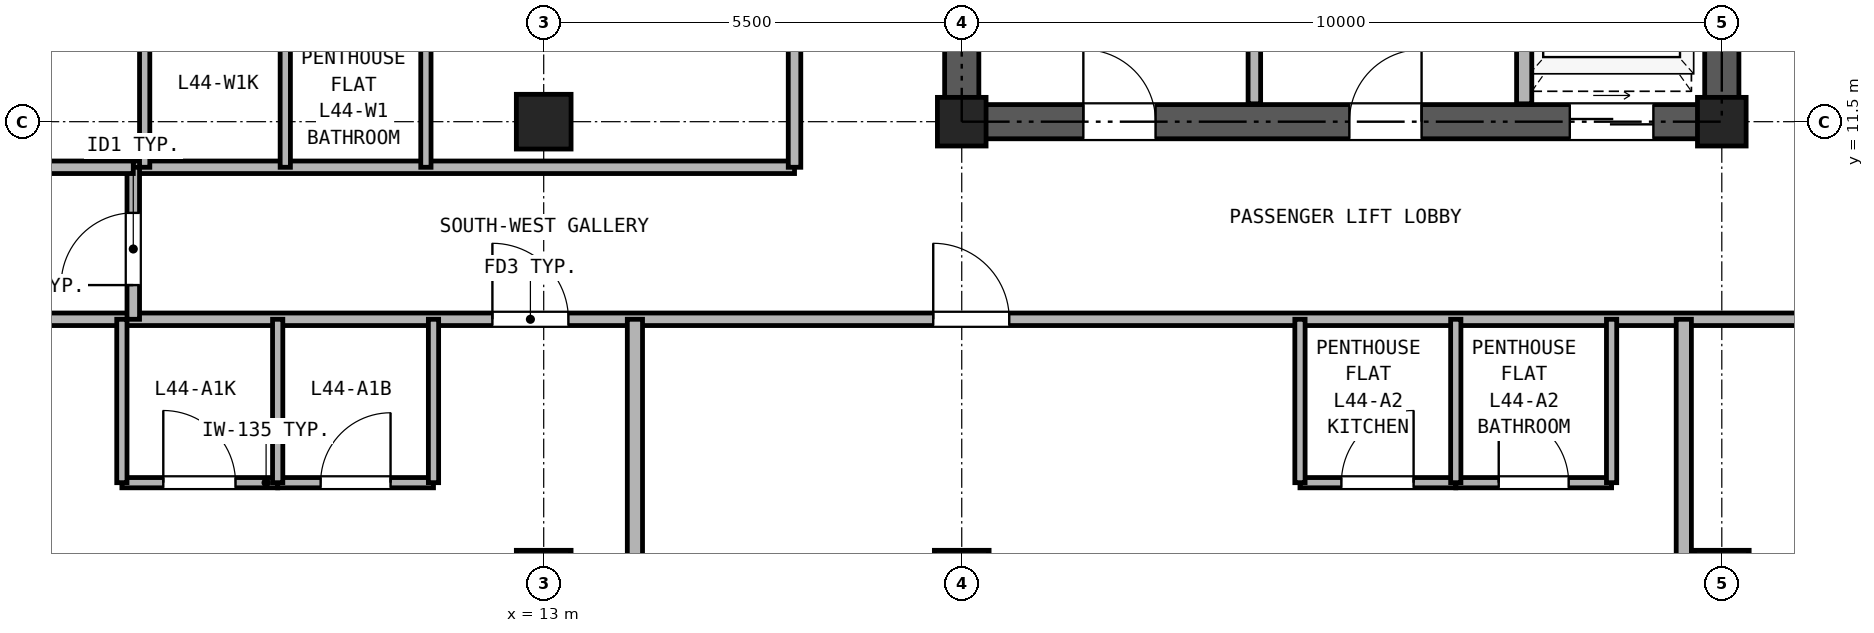
"""IFC4 building model, lengths in metres.
Left out: names, types, materials, properties, quantities, classifications, styles, units other than length and angle.
Written with IfcOpenShell. Run it as: python <this file> out.ifc"""

import sys

from ifc_helpers import new_model, si_unit, direction, frame, frame_2d, origin, origin_2d, place, context, subcontext, project, spatial, rectangle, hollow_rectangle, extrude, source, transform, mapped, element, fill, save


model = new_model("IFC4")
c1 = context("Model", 3, precision=1e-05, world=origin(), true_north=direction((0.0, 1.0)))
c2 = subcontext(c1, "Body", "Model", "MODEL_VIEW")
j1 = project(units=[si_unit("LENGTHUNIT", "METRE"), si_unit("PLANEANGLEUNIT", "RADIAN")], contexts=[c1])
p1 = place(None, origin())
s1 = spatial("IfcSite", under=j1, at=p1, CompositionType="ELEMENT")
p2 = place(p1, origin())
s2 = spatial("IfcBuilding", under=s1, at=p2, CompositionType="ELEMENT")
p3 = place(p2, frame((0.0, 0.0, 159.3)))
s3 = spatial("IfcBuildingStorey", under=s2, at=p3, CompositionType="ELEMENT", Elevation=159.3)
m1 = source(origin(), c2, "Body", "SweptSolid", [
    extrude(hollow_rectangle(XDim=0.72, YDim=0.72, WallThickness=0.04, at=origin_2d()), origin(), (0.0, 0.0, 1.0), 2.95),
])
for number, where, z_axis, x_axis in (
    (1, (13.0, 5.5, 0.0), (0.0, 0.0, 1.0), (1.0, 0.0, 0.0)),
    (2, (13.0, 11.5, 0.0), (0.0, 0.0, 1.0), (1.0, 0.0, 0.0)),
    (3, (18.5, 5.5, 0.0), (0.0, 0.0, 1.0), (1.0, 0.0, 0.0)),
):
    element("IfcColumn", number, at=place(p3, frame(where, z_axis=z_axis, x_axis=x_axis)), inside=s3, PredefinedType="COLUMN", context=c2, shape_type="MappedRepresentation", body=[
        mapped(m1, transform((0.0, 0.0, 0.0), x_axis=(1.0, 0.0, 0.0), y_axis=(0.0, 1.0, 0.0), z_axis=(0.0, 0.0, 1.0), scale=1.0)),
    ])
m2 = source(origin(), c2, "Body", "SweptSolid", [
    extrude(hollow_rectangle(XDim=0.64, YDim=0.64, WallThickness=0.035, at=origin_2d()), origin(), (0.0, 0.0, 1.0), 2.95),
])
p4 = place(p3, frame((18.5, 11.5, 0.0), z_axis=(0.0, 0.0, 1.0), x_axis=(1.0, 0.0, 0.0)))
e4 = element("IfcColumn", 4, at=p4, inside=s3, PredefinedType="COLUMN", context=c2, shape_type="MappedRepresentation", body=[
    mapped(m2, transform((0.0, 0.0, 0.0), x_axis=(1.0, 0.0, 0.0), y_axis=(0.0, 1.0, 0.0), z_axis=(0.0, 0.0, 1.0), scale=1.0)),
])
p5 = place(p3, frame((28.5, 5.5, 0.0), z_axis=(0.0, 0.0, 1.0), x_axis=(1.0, 0.0, 0.0)))
e5 = element("IfcColumn", 5, at=p5, inside=s3, PredefinedType="COLUMN", context=c2, shape_type="MappedRepresentation", body=[
    mapped(m1, transform((0.0, 0.0, 0.0), x_axis=(1.0, 0.0, 0.0), y_axis=(0.0, 1.0, 0.0), z_axis=(0.0, 0.0, 1.0), scale=1.0)),
])
p6 = place(p3, frame((28.5, 11.5, 0.0), z_axis=(0.0, 0.0, 1.0), x_axis=(1.0, 0.0, 0.0)))
e6 = element("IfcColumn", 6, at=p6, inside=s3, PredefinedType="COLUMN", context=c2, shape_type="MappedRepresentation", body=[
    mapped(m2, transform((0.0, 0.0, 0.0), x_axis=(1.0, 0.0, 0.0), y_axis=(0.0, 1.0, 0.0), z_axis=(0.0, 0.0, 1.0), scale=1.0)),
])
p7 = place(p3, frame((18.275, 11.5, 0.0), z_axis=(0.0, 0.0, 1.0), x_axis=(1.0, 0.0, 0.0)))
e7 = element("IfcWall", 7, at=p7, inside=s3, PredefinedType="SHEAR", context=c2, shape_type="SweptSolid", body=[
    extrude(rectangle(XDim=10.45, YDim=0.45, at=frame_2d((5.225, 0.0))), origin(), (0.0, 0.0, 1.0), 2.95),
])
p8 = place(p7, frame((1.825, 0.0, 0.0)))
e8 = element("IfcOpeningElement", 8, at=p8, cuts=e7, PredefinedType="OPENING", context=c2, shape_type="SweptSolid", body=[
    extrude(rectangle(XDim=0.95, YDim=2.15, at=frame_2d((0.475, 1.075))), frame((0.0, 0.235, 0.0), z_axis=(0.0, -1.0, 0.0), x_axis=(1.0, 0.0, 0.0)), (0.0, 0.0, 1.0), 0.47),
])
p9 = place(p7, frame((5.325, 0.0, 0.0)))
e9 = element("IfcOpeningElement", 9, at=p9, cuts=e7, PredefinedType="OPENING", context=c2, shape_type="SweptSolid", body=[
    extrude(rectangle(XDim=0.95, YDim=2.15, at=frame_2d((0.475, 1.075))), frame((0.0, 0.235, 0.0), z_axis=(0.0, -1.0, 0.0), x_axis=(1.0, 0.0, 0.0)), (0.0, 0.0, 1.0), 0.47),
])
p10 = place(p7, frame((8.225, 0.0, 0.0)))
e10 = element("IfcOpeningElement", 10, at=p10, cuts=e7, PredefinedType="OPENING", context=c2, shape_type="SweptSolid", body=[
    extrude(rectangle(XDim=1.1, YDim=2.25, at=frame_2d((0.55, 1.125))), frame((0.0, 0.235, 0.0), z_axis=(0.0, -1.0, 0.0), x_axis=(1.0, 0.0, 0.0)), (0.0, 0.0, 1.0), 0.47),
])
p11 = place(p3, frame((18.5, 11.725, 0.0), z_axis=(0.0, 0.0, 1.0), x_axis=(0.0, 1.0, 0.0)))
e11 = element("IfcWall", 11, at=p11, inside=s3, PredefinedType="SHEAR", context=c2, shape_type="SweptSolid", body=[
    extrude(rectangle(XDim=16.8, YDim=0.45, at=frame_2d((8.4, 0.0))), origin(), (0.0, 0.0, 1.0), 2.95),
])
p12 = place(p11, frame((7.425, 0.0, 0.0)))
e12 = element("IfcOpeningElement", 12, at=p12, cuts=e11, PredefinedType="OPENING", context=c2, shape_type="SweptSolid", body=[
    extrude(rectangle(XDim=1.15, YDim=2.2, at=frame_2d((0.575, 1.1))), frame((0.0, 0.235, 0.0), z_axis=(0.0, -1.0, 0.0), x_axis=(1.0, 0.0, 0.0)), (0.0, 0.0, 1.0), 0.47),
])
p13 = place(p3, frame((28.5, 11.725, 0.0), z_axis=(0.0, 0.0, 1.0), x_axis=(0.0, 1.0, 0.0)))
e13 = element("IfcWall", 13, at=p13, inside=s3, PredefinedType="SHEAR", context=c2, shape_type="SweptSolid", body=[
    extrude(rectangle(XDim=16.8, YDim=0.45, at=frame_2d((8.4, 0.0))), origin(), (0.0, 0.0, 1.0), 2.95),
])
p14 = place(p13, frame((7.425, 0.0, 0.0)))
e14 = element("IfcOpeningElement", 14, at=p14, cuts=e13, PredefinedType="OPENING", context=c2, shape_type="SweptSolid", body=[
    extrude(rectangle(XDim=1.15, YDim=2.2, at=frame_2d((0.575, 1.1))), frame((0.0, 0.235, 0.0), z_axis=(0.0, -1.0, 0.0), x_axis=(1.0, 0.0, 0.0)), (0.0, 0.0, 1.0), 0.47),
])
p15 = place(p3, frame((22.35, 11.735, 0.0), z_axis=(0.0, 0.0, 1.0), x_axis=(0.0, 1.0, 0.0)))
e15 = element("IfcWall", 15, at=p15, inside=s3, PredefinedType="PARTITIONING", context=c2, shape_type="SweptSolid", body=[
    extrude(rectangle(XDim=3.265, YDim=0.165, at=frame_2d((1.632, 0.0))), origin(), (0.0, 0.0, 1.0), 2.95),
])
p16 = place(p3, frame((25.9, 11.735, 0.0), z_axis=(0.0, 0.0, 1.0), x_axis=(0.0, 1.0, 0.0)))
e16 = element("IfcWall", 16, at=p16, inside=s3, PredefinedType="PARTITIONING", context=c2, shape_type="SweptSolid", body=[
    extrude(rectangle(XDim=3.265, YDim=0.2, at=frame_2d((1.632, 0.0))), origin(), (0.0, 0.0, 1.0), 2.95),
])
p17 = place(p3, frame((0.16, 8.9, 0.0), z_axis=(0.0, 0.0, 1.0), x_axis=(1.0, 0.0, 0.0)))
e17 = element("IfcWall", 17, at=p17, inside=s3, PredefinedType="PARTITIONING", context=c2, shape_type="SweptSolid", body=[
    extrude(rectangle(XDim=41.48, YDim=0.165, at=frame_2d((20.74, 0.0))), origin(), (0.0, 0.0, 1.0), 2.95),
])
p18 = place(p17, frame((12.165, 0.0, 0.0)))
e18 = element("IfcOpeningElement", 18, at=p18, cuts=e17, PredefinedType="OPENING", context=c2, shape_type="SweptSolid", body=[
    extrude(rectangle(XDim=1.0, YDim=2.15, at=frame_2d((0.5, 1.075))), frame((0.0, 0.093, 0.0), z_axis=(0.0, -1.0, 0.0), x_axis=(1.0, 0.0, 0.0)), (0.0, 0.0, 1.0), 0.185),
])
p19 = place(p17, frame((17.965, 0.0, 0.0)))
e19 = element("IfcOpeningElement", 19, at=p19, cuts=e17, PredefinedType="OPENING", context=c2, shape_type="SweptSolid", body=[
    extrude(rectangle(XDim=1.0, YDim=2.15, at=frame_2d((0.5, 1.075))), frame((0.0, 0.093, 0.0), z_axis=(0.0, -1.0, 0.0), x_axis=(1.0, 0.0, 0.0)), (0.0, 0.0, 1.0), 0.185),
])
p20 = place(p17, frame((31.115, 0.0, 0.0)))
e20 = element("IfcOpeningElement", 20, at=p20, cuts=e17, PredefinedType="OPENING", context=c2, shape_type="SweptSolid", body=[
    extrude(rectangle(XDim=1.0, YDim=2.15, at=frame_2d((0.5, 1.075))), frame((0.0, 0.093, 0.0), z_axis=(0.0, -1.0, 0.0), x_axis=(1.0, 0.0, 0.0)), (0.0, 0.0, 1.0), 0.185),
])
p21 = place(p3, frame((7.6, 10.9, 0.0), z_axis=(0.0, 0.0, 1.0), x_axis=(1.0, 0.0, 0.0)))
e21 = element("IfcWall", 21, at=p21, inside=s3, PredefinedType="PARTITIONING", context=c2, shape_type="SweptSolid", body=[
    extrude(rectangle(XDim=8.7, YDim=0.165, at=frame_2d((4.35, 0.0))), origin(), (0.0, 0.0, 1.0), 2.95),
])
p22 = place(p3, frame((7.6, 8.9, 0.0), z_axis=(0.0, 0.0, 1.0), x_axis=(0.0, 1.0, 0.0)))
e22 = element("IfcWall", 22, at=p22, inside=s3, PredefinedType="PARTITIONING", context=c2, shape_type="SweptSolid", body=[
    extrude(rectangle(XDim=2.0, YDim=0.165, at=frame_2d((1.0, 0.0))), origin(), (0.0, 0.0, 1.0), 2.95),
])
p23 = place(p22, frame((0.45, 0.0, 0.0)))
e23 = element("IfcOpeningElement", 23, at=p23, cuts=e22, PredefinedType="OPENING", context=c2, shape_type="SweptSolid", body=[
    extrude(rectangle(XDim=0.95, YDim=2.15, at=frame_2d((0.475, 1.075))), frame((0.0, 0.093, 0.0), z_axis=(0.0, -1.0, 0.0), x_axis=(1.0, 0.0, 0.0)), (0.0, 0.0, 1.0), 0.185),
])
p24 = place(p3, frame((16.3, 10.9, 0.0), z_axis=(0.0, 0.0, 1.0), x_axis=(0.0, 1.0, 0.0)))
e24 = element("IfcWall", 24, at=p24, inside=s3, PredefinedType="PARTITIONING", context=c2, shape_type="SweptSolid", body=[
    extrude(rectangle(XDim=24.24, YDim=0.165, at=frame_2d((12.12, 0.0))), origin(), (0.0, 0.0, 1.0), 2.95),
])
p25 = place(p24, frame((3.3, 0.0, 0.0)))
e25 = element("IfcOpeningElement", 25, at=p25, cuts=e24, PredefinedType="OPENING", context=c2, shape_type="SweptSolid", body=[
    extrude(rectangle(XDim=1.0, YDim=2.15, at=frame_2d((0.5, 1.075))), frame((0.0, 0.093, 0.0), z_axis=(0.0, -1.0, 0.0), x_axis=(1.0, 0.0, 0.0)), (0.0, 0.0, 1.0), 0.185),
])
p26 = place(p24, frame((11.25, 0.0, 0.0)))
e26 = element("IfcOpeningElement", 26, at=p26, cuts=e24, PredefinedType="OPENING", context=c2, shape_type="SweptSolid", body=[
    extrude(rectangle(XDim=1.0, YDim=2.15, at=frame_2d((0.5, 1.075))), frame((0.0, 0.093, 0.0), z_axis=(0.0, -1.0, 0.0), x_axis=(1.0, 0.0, 0.0)), (0.0, 0.0, 1.0), 0.185),
])
p27 = place(p24, frame((17.2, 0.0, 0.0)))
e27 = element("IfcOpeningElement", 27, at=p27, cuts=e24, PredefinedType="OPENING", context=c2, shape_type="SweptSolid", body=[
    extrude(rectangle(XDim=1.0, YDim=2.15, at=frame_2d((0.5, 1.075))), frame((0.0, 0.093, 0.0), z_axis=(0.0, -1.0, 0.0), x_axis=(1.0, 0.0, 0.0)), (0.0, 0.0, 1.0), 0.185),
])
p28 = place(p3, frame((7.45, 6.75, 0.0), z_axis=(0.0, 0.0, 1.0), x_axis=(1.0, 0.0, 0.0)))
e28 = element("IfcWall", 28, at=p28, inside=s3, PredefinedType="PARTITIONING", context=c2, shape_type="SweptSolid", body=[
    extrude(rectangle(XDim=2.05, YDim=0.135, at=frame_2d((1.025, 0.0))), origin(), (0.0, 0.0, 1.0), 2.95),
])
p29 = place(p28, frame((0.545, 0.0, 0.0)))
e29 = element("IfcOpeningElement", 29, at=p29, cuts=e28, PredefinedType="OPENING", context=c2, shape_type="SweptSolid", body=[
    extrude(rectangle(XDim=0.95, YDim=2.15, at=frame_2d((0.475, 1.075))), frame((0.0, 0.077, 0.0), z_axis=(0.0, -1.0, 0.0), x_axis=(1.0, 0.0, 0.0)), (0.0, 0.0, 1.0), 0.155),
])
p30 = place(p3, frame((9.5, 6.75, 0.0), z_axis=(0.0, 0.0, 1.0), x_axis=(1.0, 0.0, 0.0)))
e30 = element("IfcWall", 30, at=p30, inside=s3, PredefinedType="PARTITIONING", context=c2, shape_type="SweptSolid", body=[
    extrude(rectangle(XDim=2.05, YDim=0.135, at=frame_2d((1.025, 0.0))), origin(), (0.0, 0.0, 1.0), 2.95),
])
p31 = place(p30, frame((0.565, 0.0, 0.0)))
e31 = element("IfcOpeningElement", 31, at=p31, cuts=e30, PredefinedType="OPENING", context=c2, shape_type="SweptSolid", body=[
    extrude(rectangle(XDim=0.92, YDim=2.1, at=frame_2d((0.46, 1.05))), frame((0.0, 0.077, 0.0), z_axis=(0.0, -1.0, 0.0), x_axis=(1.0, 0.0, 0.0)), (0.0, 0.0, 1.0), 0.155),
])
for number, where, z_axis, x_axis in (
    (32, (7.45, 6.75, 0.0), (0.0, 0.0, 1.0), (0.0, 1.0, 0.0)),
    (33, (9.5, 6.75, 0.0), (0.0, 0.0, 1.0), (0.0, 1.0, 0.0)),
    (34, (11.55, 6.75, 0.0), (0.0, 0.0, 1.0), (0.0, 1.0, 0.0)),
):
    element("IfcWall", number, at=place(p3, frame(where, z_axis=z_axis, x_axis=x_axis)), inside=s3, PredefinedType="PARTITIONING", context=c2, shape_type="SweptSolid", body=[
        extrude(rectangle(XDim=2.15, YDim=0.135, at=frame_2d((1.075, 0.0))), origin(), (0.0, 0.0, 1.0), 2.95),
    ])
p32 = place(p3, frame((14.2, 0.16, 0.0), z_axis=(0.0, 0.0, 1.0), x_axis=(0.0, 1.0, 0.0)))
e35 = element("IfcWall", 35, at=p32, inside=s3, PredefinedType="PARTITIONING", context=c2, shape_type="SweptSolid", body=[
    extrude(rectangle(XDim=8.74, YDim=0.2, at=frame_2d((4.37, 0.0))), origin(), (0.0, 0.0, 1.0), 2.95),
])
p33 = place(p3, frame((22.95, 6.75, 0.0), z_axis=(0.0, 0.0, 1.0), x_axis=(1.0, 0.0, 0.0)))
e36 = element("IfcWall", 36, at=p33, inside=s3, PredefinedType="PARTITIONING", context=c2, shape_type="SweptSolid", body=[
    extrude(rectangle(XDim=2.05, YDim=0.135, at=frame_2d((1.025, 0.0))), origin(), (0.0, 0.0, 1.0), 2.95),
])
p34 = place(p33, frame((0.545, 0.0, 0.0)))
e37 = element("IfcOpeningElement", 37, at=p34, cuts=e36, PredefinedType="OPENING", context=c2, shape_type="SweptSolid", body=[
    extrude(rectangle(XDim=0.95, YDim=2.15, at=frame_2d((0.475, 1.075))), frame((0.0, 0.077, 0.0), z_axis=(0.0, -1.0, 0.0), x_axis=(1.0, 0.0, 0.0)), (0.0, 0.0, 1.0), 0.155),
])
p35 = place(p3, frame((25.0, 6.75, 0.0), z_axis=(0.0, 0.0, 1.0), x_axis=(1.0, 0.0, 0.0)))
e38 = element("IfcWall", 38, at=p35, inside=s3, PredefinedType="PARTITIONING", context=c2, shape_type="SweptSolid", body=[
    extrude(rectangle(XDim=2.05, YDim=0.135, at=frame_2d((1.025, 0.0))), origin(), (0.0, 0.0, 1.0), 2.95),
])
p36 = place(p35, frame((0.565, 0.0, 0.0)))
e39 = element("IfcOpeningElement", 39, at=p36, cuts=e38, PredefinedType="OPENING", context=c2, shape_type="SweptSolid", body=[
    extrude(rectangle(XDim=0.92, YDim=2.1, at=frame_2d((0.46, 1.05))), frame((0.0, 0.077, 0.0), z_axis=(0.0, -1.0, 0.0), x_axis=(1.0, 0.0, 0.0)), (0.0, 0.0, 1.0), 0.155),
])
for number, where, z_axis, x_axis in (
    (40, (22.95, 6.75, 0.0), (0.0, 0.0, 1.0), (0.0, 1.0, 0.0)),
    (41, (25.0, 6.75, 0.0), (0.0, 0.0, 1.0), (0.0, 1.0, 0.0)),
    (42, (27.05, 6.75, 0.0), (0.0, 0.0, 1.0), (0.0, 1.0, 0.0)),
):
    element("IfcWall", number, at=place(p3, frame(where, z_axis=z_axis, x_axis=x_axis)), inside=s3, PredefinedType="PARTITIONING", context=c2, shape_type="SweptSolid", body=[
        extrude(rectangle(XDim=2.15, YDim=0.135, at=frame_2d((1.075, 0.0))), origin(), (0.0, 0.0, 1.0), 2.95),
    ])
p37 = place(p3, frame((28.0, 0.16, 0.0), z_axis=(0.0, 0.0, 1.0), x_axis=(0.0, 1.0, 0.0)))
e43 = element("IfcWall", 43, at=p37, inside=s3, PredefinedType="PARTITIONING", context=c2, shape_type="SweptSolid", body=[
    extrude(rectangle(XDim=8.74, YDim=0.2, at=frame_2d((4.37, 0.0))), origin(), (0.0, 0.0, 1.0), 2.95),
])
p38 = place(p3, frame((0.16, 10.9, 0.0), z_axis=(0.0, 0.0, 1.0), x_axis=(1.0, 0.0, 0.0)))
e44 = element("IfcWall", 44, at=p38, inside=s3, PredefinedType="PARTITIONING", context=c2, shape_type="SweptSolid", body=[
    extrude(rectangle(XDim=7.44, YDim=0.165, at=frame_2d((3.72, 0.0))), origin(), (0.0, 0.0, 1.0), 2.95),
])
for number, where, z_axis, x_axis in (
    (45, (7.75, 10.9, 0.0), (0.0, 0.0, 1.0), (0.0, 1.0, 0.0)),
    (46, (9.6, 10.9, 0.0), (0.0, 0.0, 1.0), (0.0, 1.0, 0.0)),
    (47, (11.45, 10.9, 0.0), (0.0, 0.0, 1.0), (0.0, 1.0, 0.0)),
):
    element("IfcWall", number, at=place(p3, frame(where, z_axis=z_axis, x_axis=x_axis)), inside=s3, PredefinedType="PARTITIONING", context=c2, shape_type="SweptSolid", body=[
        extrude(rectangle(XDim=2.15, YDim=0.135, at=frame_2d((1.075, 0.0))), origin(), (0.0, 0.0, 1.0), 2.95),
    ])
p39 = place(p8, frame((0.95, 0.0, 0.0), z_axis=(0.0, 0.0, 1.0), x_axis=(-1.0, 0.0, 0.0)))
e48 = element("IfcDoor", 48, at=p39, inside=s3, OperationType="SINGLE_SWING_LEFT", PredefinedType="DOOR", context=c2, shape_type="SweptSolid", body=[
    extrude(rectangle(XDim=0.95, YDim=2.15, at=frame_2d((0.475, 1.075))), frame((0.0, 0.025, 0.0), z_axis=(0.0, -1.0, 0.0), x_axis=(1.0, 0.0, 0.0)), (0.0, 0.0, 1.0), 0.05),
])
fill(e8, e48)
p40 = place(p9, frame((0.95, 0.0, 0.0), z_axis=(0.0, 0.0, 1.0), x_axis=(-1.0, 0.0, 0.0)))
e49 = element("IfcDoor", 49, at=p40, inside=s3, OperationType="SINGLE_SWING_RIGHT", PredefinedType="DOOR", context=c2, shape_type="SweptSolid", body=[
    extrude(rectangle(XDim=0.95, YDim=2.15, at=frame_2d((0.475, 1.075))), frame((0.0, 0.025, 0.0), z_axis=(0.0, -1.0, 0.0), x_axis=(1.0, 0.0, 0.0)), (0.0, 0.0, 1.0), 0.05),
])
fill(e9, e49)
p41 = place(p10, frame((1.1, 0.0, 0.0), z_axis=(0.0, 0.0, 1.0), x_axis=(-1.0, 0.0, 0.0)))
e50 = element("IfcDoor", 50, at=p41, inside=s3, OperationType="DOUBLE_DOOR_SLIDING", PredefinedType="DOOR", context=c2, shape_type="SweptSolid", body=[
    extrude(rectangle(XDim=1.1, YDim=2.25, at=frame_2d((0.55, 1.125))), frame((0.0, 0.025, 0.0), z_axis=(0.0, -1.0, 0.0), x_axis=(1.0, 0.0, 0.0)), (0.0, 0.0, 1.0), 0.05),
])
fill(e10, e50)
p42 = place(p29, origin())
e51 = element("IfcDoor", 51, at=p42, inside=s3, OperationType="SINGLE_SWING_LEFT", PredefinedType="DOOR", context=c2, shape_type="SweptSolid", body=[
    extrude(rectangle(XDim=0.95, YDim=2.15, at=frame_2d((0.475, 1.075))), frame((0.0, 0.025, 0.0), z_axis=(0.0, -1.0, 0.0), x_axis=(1.0, 0.0, 0.0)), (0.0, 0.0, 1.0), 0.05),
])
fill(e29, e51)
p43 = place(p31, origin())
e52 = element("IfcDoor", 52, at=p43, inside=s3, OperationType="SINGLE_SWING_RIGHT", PredefinedType="DOOR", context=c2, shape_type="SweptSolid", body=[
    extrude(rectangle(XDim=0.92, YDim=2.1, at=frame_2d((0.46, 1.05))), frame((0.0, 0.025, 0.0), z_axis=(0.0, -1.0, 0.0), x_axis=(1.0, 0.0, 0.0)), (0.0, 0.0, 1.0), 0.05),
])
fill(e31, e52)
p44 = place(p18, frame((1.0, 0.0, 0.0), z_axis=(0.0, 0.0, 1.0), x_axis=(-1.0, 0.0, 0.0)))
e53 = element("IfcDoor", 53, at=p44, inside=s3, OperationType="SINGLE_SWING_LEFT", PredefinedType="DOOR", context=c2, shape_type="SweptSolid", body=[
    extrude(rectangle(XDim=1.0, YDim=2.15, at=frame_2d((0.5, 1.075))), frame((0.0, 0.025, 0.0), z_axis=(0.0, -1.0, 0.0), x_axis=(1.0, 0.0, 0.0)), (0.0, 0.0, 1.0), 0.05),
])
fill(e18, e53)
p45 = place(p34, origin())
e54 = element("IfcDoor", 54, at=p45, inside=s3, OperationType="SINGLE_SWING_RIGHT", PredefinedType="DOOR", context=c2, shape_type="SweptSolid", body=[
    extrude(rectangle(XDim=0.95, YDim=2.15, at=frame_2d((0.475, 1.075))), frame((0.0, 0.025, 0.0), z_axis=(0.0, -1.0, 0.0), x_axis=(1.0, 0.0, 0.0)), (0.0, 0.0, 1.0), 0.05),
])
fill(e37, e54)
p46 = place(p36, origin())
e55 = element("IfcDoor", 55, at=p46, inside=s3, OperationType="SINGLE_SWING_LEFT", PredefinedType="DOOR", context=c2, shape_type="SweptSolid", body=[
    extrude(rectangle(XDim=0.92, YDim=2.1, at=frame_2d((0.46, 1.05))), frame((0.0, 0.025, 0.0), z_axis=(0.0, -1.0, 0.0), x_axis=(1.0, 0.0, 0.0)), (0.0, 0.0, 1.0), 0.05),
])
fill(e39, e55)
p47 = place(p19, frame((1.0, 0.0, 0.0), z_axis=(0.0, 0.0, 1.0), x_axis=(-1.0, 0.0, 0.0)))
e56 = element("IfcDoor", 56, at=p47, inside=s3, OperationType="SINGLE_SWING_LEFT", PredefinedType="DOOR", context=c2, shape_type="SweptSolid", body=[
    extrude(rectangle(XDim=1.0, YDim=2.15, at=frame_2d((0.5, 1.075))), frame((0.0, 0.025, 0.0), z_axis=(0.0, -1.0, 0.0), x_axis=(1.0, 0.0, 0.0)), (0.0, 0.0, 1.0), 0.05),
])
fill(e19, e56)
p48 = place(p23, frame((0.95, 0.0, 0.0), z_axis=(0.0, 0.0, 1.0), x_axis=(-1.0, 0.0, 0.0)))
e57 = element("IfcDoor", 57, at=p48, inside=s3, OperationType="SINGLE_SWING_LEFT", PredefinedType="DOOR", context=c2, shape_type="SweptSolid", body=[
    extrude(rectangle(XDim=0.95, YDim=2.15, at=frame_2d((0.475, 1.075))), frame((0.0, 0.025, 0.0), z_axis=(0.0, -1.0, 0.0), x_axis=(1.0, 0.0, 0.0)), (0.0, 0.0, 1.0), 0.05),
])
fill(e23, e57)
save(model, sys.argv[1])
